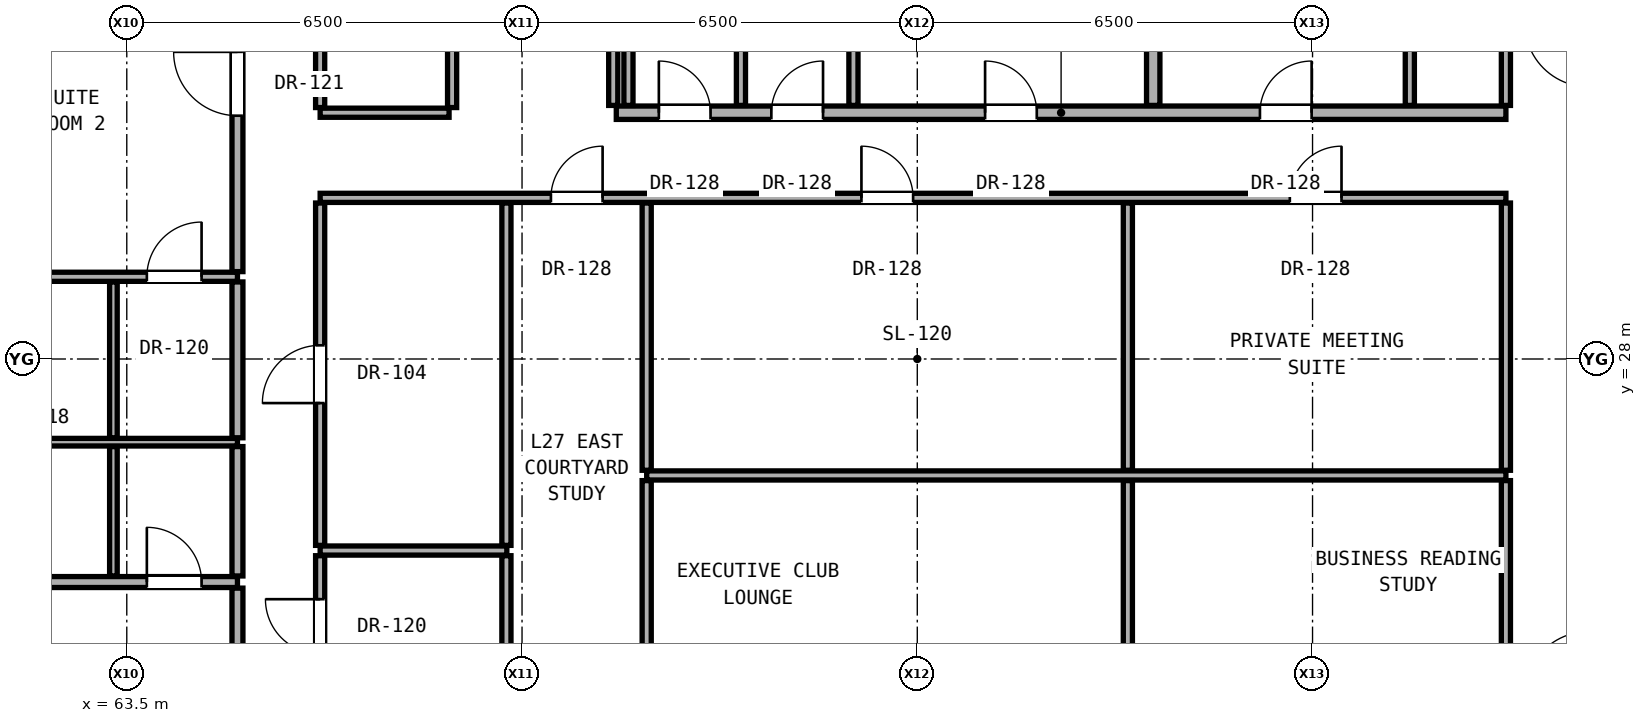
"""IFC4 building model, lengths in metres.
Left out: names, types, materials, properties, quantities, classifications, styles, units other than length and angle.
Written with IfcOpenShell. Run it as: python <this file> out.ifc"""

import sys

from ifc_helpers import new_model, si_unit, direction, frame, frame_2d, origin, place, context, subcontext, project, spatial, rectangle, extrude, element, fill, save


model = new_model("IFC4")
c1 = context("Model", 3, precision=1e-05, world=origin(), true_north=direction((0.0, 1.0)))
c2 = subcontext(c1, "Body", "Model", "MODEL_VIEW")
j1 = project(units=[si_unit("LENGTHUNIT", "METRE"), si_unit("PLANEANGLEUNIT", "RADIAN")], contexts=[c1])
p1 = place(None, origin())
s1 = spatial("IfcSite", under=j1, at=p1, CompositionType="ELEMENT")
p2 = place(p1, origin())
s2 = spatial("IfcBuilding", under=s1, at=p2, CompositionType="ELEMENT")
p3 = place(p2, frame((0.0, 0.0, 98.3)))
s3 = spatial("IfcBuildingStorey", under=s2, at=p3, CompositionType="ELEMENT", Elevation=98.3)
p4 = place(p3, frame((58.643, 24.332, 0.0), z_axis=(0.0, 0.0, 1.0), x_axis=(1.0, 0.0, 0.0)))
e1 = element("IfcWall", 1, at=p4, inside=s3, PredefinedType="PARTITIONING", context=c2, shape_type="SweptSolid", body=[
    extrude(rectangle(XDim=6.677, YDim=0.18, at=frame_2d((3.338, 0.0))), origin(), (0.0, 0.0, 1.0), 2.216),
])
p5 = place(p4, frame((1.864, 0.0, 0.0)))
e2 = element("IfcOpeningElement", 2, at=p5, cuts=e1, PredefinedType="OPENING", context=c2, shape_type="SweptSolid", body=[
    extrude(rectangle(XDim=0.95, YDim=2.15, at=frame_2d((0.475, 1.075))), frame((0.0, 0.1, 0.0), z_axis=(0.0, -1.0, 0.0), x_axis=(1.0, 0.0, 0.0)), (0.0, 0.0, 1.0), 0.2),
])
p6 = place(p4, frame((5.187, 0.0, 0.0)))
e3 = element("IfcOpeningElement", 3, at=p6, cuts=e1, PredefinedType="OPENING", context=c2, shape_type="SweptSolid", body=[
    extrude(rectangle(XDim=0.9, YDim=2.1, at=frame_2d((0.45, 1.05))), frame((0.0, 0.1, 0.0), z_axis=(0.0, -1.0, 0.0), x_axis=(1.0, 0.0, 0.0)), (0.0, 0.0, 1.0), 0.2),
])
p7 = place(p3, frame((66.68, 24.85, 0.0), z_axis=(0.0, 0.0, 1.0), x_axis=(1.0, 0.0, 0.0)))
e4 = element("IfcWall", 4, at=p7, inside=s3, PredefinedType="PARTITIONING", context=c2, shape_type="SweptSolid", body=[
    extrude(rectangle(XDim=3.07, YDim=0.15, at=frame_2d((1.535, 0.0))), origin(), (0.0, 0.0, 1.0), 2.145),
])
p8 = place(p3, frame((72.05, 26.085, 0.0), z_axis=(0.0, 0.0, 1.0), x_axis=(1.0, 0.0, 0.0)))
e5 = element("IfcWall", 5, at=p8, inside=s3, PredefinedType="PARTITIONING", context=c2, shape_type="SweptSolid", body=[
    extrude(rectangle(XDim=14.13, YDim=0.15, at=frame_2d((7.065, 0.0))), origin(), (0.0, 0.0, 1.0), 2.145),
])
p9 = place(p3, frame((58.643, 26.632, 0.0), z_axis=(0.0, 0.0, 1.0), x_axis=(1.0, 0.0, 0.0)))
e6 = element("IfcWall", 6, at=p9, inside=s3, PredefinedType="PARTITIONING", context=c2, shape_type="SweptSolid", body=[
    extrude(rectangle(XDim=6.677, YDim=0.125, at=frame_2d((3.338, 0.0))), origin(), (0.0, 0.0, 1.0), 2.216),
])
p10 = place(p3, frame((58.643, 29.352, 0.0), z_axis=(0.0, 0.0, 1.0), x_axis=(1.0, 0.0, 0.0)))
e7 = element("IfcWall", 7, at=p10, inside=s3, PredefinedType="PARTITIONING", context=c2, shape_type="SweptSolid", body=[
    extrude(rectangle(XDim=6.677, YDim=0.15, at=frame_2d((3.338, 0.0))), origin(), (0.0, 0.0, 1.0), 2.216),
])
p11 = place(p10, frame((0.513, 0.0, 0.0)))
e8 = element("IfcOpeningElement", 8, at=p11, cuts=e7, PredefinedType="OPENING", context=c2, shape_type="SweptSolid", body=[
    extrude(rectangle(XDim=0.95, YDim=2.15, at=frame_2d((0.475, 1.075))), frame((0.0, 0.085, 0.0), z_axis=(0.0, -1.0, 0.0), x_axis=(1.0, 0.0, 0.0)), (0.0, 0.0, 1.0), 0.17),
])
p12 = place(p10, frame((5.187, 0.0, 0.0)))
e9 = element("IfcOpeningElement", 9, at=p12, cuts=e7, PredefinedType="OPENING", context=c2, shape_type="SweptSolid", body=[
    extrude(rectangle(XDim=0.9, YDim=2.1, at=frame_2d((0.45, 1.05))), frame((0.0, 0.085, 0.0), z_axis=(0.0, -1.0, 0.0), x_axis=(1.0, 0.0, 0.0)), (0.0, 0.0, 1.0), 0.17),
])
p13 = place(p3, frame((66.68, 30.65, 0.0), z_axis=(0.0, 0.0, 1.0), x_axis=(1.0, 0.0, 0.0)))
e10 = element("IfcWall", 10, at=p13, inside=s3, PredefinedType="PARTITIONING", context=c2, shape_type="SweptSolid", body=[
    extrude(rectangle(XDim=19.5, YDim=0.15, at=frame_2d((9.75, 0.0))), origin(), (0.0, 0.0, 1.0), 2.145),
])
p14 = place(p13, frame((3.795, 0.0, 0.0)))
e11 = element("IfcOpeningElement", 11, at=p14, cuts=e10, PredefinedType="OPENING", context=c2, shape_type="SweptSolid", body=[
    extrude(rectangle(XDim=0.85, YDim=2.01, at=frame_2d((0.425, 1.005))), frame((0.0, 0.085, 0.0), z_axis=(0.0, -1.0, 0.0), x_axis=(1.0, 0.0, 0.0)), (0.0, 0.0, 1.0), 0.17),
])
p15 = place(p13, frame((8.902, 0.0, 0.0)))
e12 = element("IfcOpeningElement", 12, at=p15, cuts=e10, PredefinedType="OPENING", context=c2, shape_type="SweptSolid", body=[
    extrude(rectangle(XDim=0.85, YDim=2.01, at=frame_2d((0.425, 1.005))), frame((0.0, 0.085, 0.0), z_axis=(0.0, -1.0, 0.0), x_axis=(1.0, 0.0, 0.0)), (0.0, 0.0, 1.0), 0.17),
])
p16 = place(p13, frame((15.947, 0.0, 0.0)))
e13 = element("IfcOpeningElement", 13, at=p16, cuts=e10, PredefinedType="OPENING", context=c2, shape_type="SweptSolid", body=[
    extrude(rectangle(XDim=0.85, YDim=2.01, at=frame_2d((0.425, 1.005))), frame((0.0, 0.085, 0.0), z_axis=(0.0, -1.0, 0.0), x_axis=(1.0, 0.0, 0.0)), (0.0, 0.0, 1.0), 0.17),
])
p17 = place(p3, frame((66.68, 32.05, 0.0), z_axis=(0.0, 0.0, 1.0), x_axis=(1.0, 0.0, 0.0)))
e14 = element("IfcWall", 14, at=p17, inside=s3, PredefinedType="PARTITIONING", context=c2, shape_type="SweptSolid", body=[
    extrude(rectangle(XDim=2.12, YDim=0.15, at=frame_2d((1.06, 0.0))), origin(), (0.0, 0.0, 1.0), 2.145),
])
p18 = place(p3, frame((71.55, 32.05, 0.0), z_axis=(0.0, 0.0, 1.0), x_axis=(1.0, 0.0, 0.0)))
e15 = element("IfcWall", 15, at=p18, inside=s3, PredefinedType="SOLIDWALL", context=c2, shape_type="SweptSolid", body=[
    extrude(rectangle(XDim=14.63, YDim=0.22, at=frame_2d((7.315, 0.0))), origin(), (0.0, 0.0, 1.0), 2.145),
])
p19 = place(p18, frame((6.065, 0.0, 0.0)))
e16 = element("IfcOpeningElement", 16, at=p19, cuts=e15, PredefinedType="OPENING", context=c2, shape_type="SweptSolid", body=[
    extrude(rectangle(XDim=0.85, YDim=2.01, at=frame_2d((0.425, 1.005))), frame((0.0, 0.12, 0.0), z_axis=(0.0, -1.0, 0.0), x_axis=(1.0, 0.0, 0.0)), (0.0, 0.0, 1.0), 0.24),
])
p20 = place(p18, frame((10.585, 0.0, 0.0)))
e17 = element("IfcOpeningElement", 17, at=p20, cuts=e15, PredefinedType="OPENING", context=c2, shape_type="SweptSolid", body=[
    extrude(rectangle(XDim=0.85, YDim=2.01, at=frame_2d((0.425, 1.005))), frame((0.0, 0.12, 0.0), z_axis=(0.0, -1.0, 0.0), x_axis=(1.0, 0.0, 0.0)), (0.0, 0.0, 1.0), 0.24),
])
p21 = place(p18, frame((0.7, 0.0, 0.0)))
e18 = element("IfcOpeningElement", 18, at=p21, cuts=e15, PredefinedType="OPENING", context=c2, shape_type="SweptSolid", body=[
    extrude(rectangle(XDim=0.85, YDim=2.01, at=frame_2d((0.425, 1.005))), frame((0.0, 0.12, 0.0), z_axis=(0.0, -1.0, 0.0), x_axis=(1.0, 0.0, 0.0)), (0.0, 0.0, 1.0), 0.24),
])
p22 = place(p18, frame((2.55, 0.0, 0.0)))
e19 = element("IfcOpeningElement", 19, at=p22, cuts=e15, PredefinedType="OPENING", context=c2, shape_type="SweptSolid", body=[
    extrude(rectangle(XDim=0.85, YDim=2.01, at=frame_2d((0.425, 1.005))), frame((0.0, 0.12, 0.0), z_axis=(0.0, -1.0, 0.0), x_axis=(1.0, 0.0, 0.0)), (0.0, 0.0, 1.0), 0.24),
])
p23 = place(p3, frame((63.28, 24.432, 0.0), z_axis=(0.0, 0.0, 1.0), x_axis=(0.0, 1.0, 0.0)))
e20 = element("IfcWall", 20, at=p23, inside=s3, PredefinedType="PARTITIONING", context=c2, shape_type="SweptSolid", body=[
    extrude(rectangle(XDim=2.128, YDim=0.125, at=frame_2d((1.064, 0.0))), origin(), (0.0, 0.0, 1.0), 3.08),
])
p24 = place(p3, frame((63.28, 26.705, 0.0), z_axis=(0.0, 0.0, 1.0), x_axis=(0.0, 1.0, 0.0)))
e21 = element("IfcWall", 21, at=p24, inside=s3, PredefinedType="PARTITIONING", context=c2, shape_type="SweptSolid", body=[
    extrude(rectangle(XDim=2.562, YDim=0.125, at=frame_2d((1.281, 0.0))), origin(), (0.0, 0.0, 1.0), 2.299),
])
p25 = place(p3, frame((65.32, 20.385, 0.0), z_axis=(0.0, 0.0, 1.0), x_axis=(0.0, 1.0, 0.0)))
e22 = element("IfcWall", 22, at=p25, inside=s3, PredefinedType="PARTITIONING", context=c2, shape_type="SweptSolid", body=[
    extrude(rectangle(XDim=3.847, YDim=0.18, at=frame_2d((1.923, 0.0))), origin(), (0.0, 0.0, 1.0), 2.472),
])
p26 = place(p25, frame((1.398, 0.0, 0.0)))
e23 = element("IfcOpeningElement", 23, at=p26, cuts=e22, PredefinedType="OPENING", context=c2, shape_type="SweptSolid", body=[
    extrude(rectangle(XDim=1.05, YDim=2.2, at=frame_2d((0.525, 1.1))), frame((0.0, 0.1, 0.0), z_axis=(0.0, -1.0, 0.0), x_axis=(1.0, 0.0, 0.0)), (0.0, 0.0, 1.0), 0.2),
])
p27 = place(p3, frame((65.32, 24.432, 0.0), z_axis=(0.0, 0.0, 1.0), x_axis=(0.0, 1.0, 0.0)))
e24 = element("IfcWall", 24, at=p27, inside=s3, PredefinedType="PARTITIONING", context=c2, shape_type="SweptSolid", body=[
    extrude(rectangle(XDim=2.128, YDim=0.18, at=frame_2d((1.064, 0.0))), origin(), (0.0, 0.0, 1.0), 3.08),
])
p28 = place(p3, frame((65.32, 26.705, 0.0), z_axis=(0.0, 0.0, 1.0), x_axis=(0.0, 1.0, 0.0)))
e25 = element("IfcWall", 25, at=p28, inside=s3, PredefinedType="PARTITIONING", context=c2, shape_type="SweptSolid", body=[
    extrude(rectangle(XDim=2.562, YDim=0.18, at=frame_2d((1.281, 0.0))), origin(), (0.0, 0.0, 1.0), 2.299),
])
p29 = place(p3, frame((65.32, 29.437, 0.0), z_axis=(0.0, 0.0, 1.0), x_axis=(0.0, 1.0, 0.0)))
e26 = element("IfcWall", 26, at=p29, inside=s3, PredefinedType="PARTITIONING", context=c2, shape_type="SweptSolid", body=[
    extrude(rectangle(XDim=6.178, YDim=0.18, at=frame_2d((3.089, 0.0))), origin(), (0.0, 0.0, 1.0), 2.472),
])
p30 = place(p29, frame((2.564, 0.0, 0.0)))
e27 = element("IfcOpeningElement", 27, at=p30, cuts=e26, PredefinedType="OPENING", context=c2, shape_type="SweptSolid", body=[
    extrude(rectangle(XDim=1.05, YDim=2.2, at=frame_2d((0.525, 1.1))), frame((0.0, 0.1, 0.0), z_axis=(0.0, -1.0, 0.0), x_axis=(1.0, 0.0, 0.0)), (0.0, 0.0, 1.0), 0.2),
])
p31 = place(p3, frame((66.68, 22.435, 0.0), z_axis=(0.0, 0.0, 1.0), x_axis=(0.0, 1.0, 0.0)))
e28 = element("IfcWall", 28, at=p31, inside=s3, PredefinedType="PARTITIONING", context=c2, shape_type="SweptSolid", body=[
    extrude(rectangle(XDim=2.33, YDim=0.15, at=frame_2d((1.165, 0.0))), origin(), (0.0, 0.0, 1.0), 3.08),
])
p32 = place(p31, frame((0.715, 0.0, 0.0)))
e29 = element("IfcOpeningElement", 29, at=p32, cuts=e28, PredefinedType="OPENING", context=c2, shape_type="SweptSolid", body=[
    extrude(rectangle(XDim=0.9, YDim=2.1, at=frame_2d((0.45, 1.05))), frame((0.0, 0.085, 0.0), z_axis=(0.0, -1.0, 0.0), x_axis=(1.0, 0.0, 0.0)), (0.0, 0.0, 1.0), 0.17),
])
p33 = place(p3, frame((66.68, 24.935, 0.0), z_axis=(0.0, 0.0, 1.0), x_axis=(0.0, 1.0, 0.0)))
e30 = element("IfcWall", 30, at=p33, inside=s3, PredefinedType="PARTITIONING", context=c2, shape_type="SweptSolid", body=[
    extrude(rectangle(XDim=5.63, YDim=0.15, at=frame_2d((2.815, 0.0))), origin(), (0.0, 0.0, 1.0), 2.299),
])
p34 = place(p33, frame((2.34, 0.0, 0.0)))
e31 = element("IfcOpeningElement", 31, at=p34, cuts=e30, PredefinedType="OPENING", context=c2, shape_type="SweptSolid", body=[
    extrude(rectangle(XDim=0.95, YDim=2.15, at=frame_2d((0.475, 1.075))), frame((0.0, 0.085, 0.0), z_axis=(0.0, -1.0, 0.0), x_axis=(1.0, 0.0, 0.0)), (0.0, 0.0, 1.0), 0.17),
])
p35 = place(p3, frame((66.68, 32.135, 0.0), z_axis=(0.0, 0.0, 1.0), x_axis=(0.0, 1.0, 0.0)))
e32 = element("IfcWall", 32, at=p35, inside=s3, PredefinedType="PARTITIONING", context=c2, shape_type="SweptSolid", body=[
    extrude(rectangle(XDim=3.48, YDim=0.15, at=frame_2d((1.74, 0.0))), origin(), (0.0, 0.0, 1.0), 2.472),
])
p36 = place(p3, frame((68.85, 32.135, 0.0), z_axis=(0.0, 0.0, 1.0), x_axis=(0.0, 1.0, 0.0)))
e33 = element("IfcWall", 33, at=p36, inside=s3, PredefinedType="PARTITIONING", context=c2, shape_type="SweptSolid", body=[
    extrude(rectangle(XDim=2.745, YDim=0.15, at=frame_2d((1.373, 0.0))), origin(), (0.0, 0.0, 1.0), 3.08),
])
p37 = place(p3, frame((69.743, 22.435, 0.0), z_axis=(0.0, 0.0, 1.0), x_axis=(0.0, 1.0, 0.0)))
e34 = element("IfcWall", 34, at=p37, inside=s3, PredefinedType="PARTITIONING", context=c2, shape_type="SweptSolid", body=[
    extrude(rectangle(XDim=2.33, YDim=0.15, at=frame_2d((1.165, 0.0))), origin(), (0.0, 0.0, 1.0), 3.08),
])
p38 = place(p3, frame((69.743, 24.935, 0.0), z_axis=(0.0, 0.0, 1.0), x_axis=(0.0, 1.0, 0.0)))
e35 = element("IfcWall", 35, at=p38, inside=s3, PredefinedType="PARTITIONING", context=c2, shape_type="SweptSolid", body=[
    extrude(rectangle(XDim=5.63, YDim=0.15, at=frame_2d((2.815, 0.0))), origin(), (0.0, 0.0, 1.0), 2.145),
])
for number, where, z_axis, x_axis in (
    (36, (71.5, 32.17, 0.0), (0.0, 0.0, 1.0), (0.0, 1.0, 0.0)),
    (37, (71.75, 32.17, 0.0), (0.0, 0.0, 1.0), (0.0, 1.0, 0.0)),
):
    element("IfcWall", number, at=place(p3, frame(where, z_axis=z_axis, x_axis=x_axis)), inside=s3, PredefinedType="PARTITIONING", context=c2, shape_type="SweptSolid", body=[
        extrude(rectangle(XDim=2.71, YDim=0.15, at=frame_2d((1.355, 0.0))), origin(), (0.0, 0.0, 1.0), 3.08),
    ])
p39 = place(p3, frame((72.05, 22.435, 0.0), z_axis=(0.0, 0.0, 1.0), x_axis=(0.0, 1.0, 0.0)))
e38 = element("IfcWall", 38, at=p39, inside=s3, PredefinedType="PARTITIONING", context=c2, shape_type="SweptSolid", body=[
    extrude(rectangle(XDim=3.565, YDim=0.15, at=frame_2d((1.782, 0.0))), origin(), (0.0, 0.0, 1.0), 2.609),
])
p40 = place(p3, frame((72.05, 26.17, 0.0), z_axis=(0.0, 0.0, 1.0), x_axis=(0.0, 1.0, 0.0)))
e39 = element("IfcWall", 39, at=p40, inside=s3, PredefinedType="PARTITIONING", context=c2, shape_type="SweptSolid", body=[
    extrude(rectangle(XDim=4.395, YDim=0.15, at=frame_2d((2.198, 0.0))), origin(), (0.0, 0.0, 1.0), 2.145),
])
for number, where, z_axis, x_axis in (
    (40, (73.6, 32.17, 0.0), (0.0, 0.0, 1.0), (0.0, 1.0, 0.0)),
    (41, (75.45, 32.17, 0.0), (0.0, 0.0, 1.0), (0.0, 1.0, 0.0)),
):
    element("IfcWall", number, at=place(p3, frame(where, z_axis=z_axis, x_axis=x_axis)), inside=s3, PredefinedType="PARTITIONING", context=c2, shape_type="SweptSolid", body=[
        extrude(rectangle(XDim=2.71, YDim=0.15, at=frame_2d((1.355, 0.0))), origin(), (0.0, 0.0, 1.0), 3.08),
    ])
p41 = place(p3, frame((79.963, 22.435, 0.0), z_axis=(0.0, 0.0, 1.0), x_axis=(0.0, 1.0, 0.0)))
e42 = element("IfcWall", 42, at=p41, inside=s3, PredefinedType="PARTITIONING", context=c2, shape_type="SweptSolid", body=[
    extrude(rectangle(XDim=3.565, YDim=0.15, at=frame_2d((1.782, 0.0))), origin(), (0.0, 0.0, 1.0), 3.08),
])
p42 = place(p3, frame((79.963, 26.17, 0.0), z_axis=(0.0, 0.0, 1.0), x_axis=(0.0, 1.0, 0.0)))
e43 = element("IfcWall", 43, at=p42, inside=s3, PredefinedType="PARTITIONING", context=c2, shape_type="SweptSolid", body=[
    extrude(rectangle(XDim=4.395, YDim=0.15, at=frame_2d((2.198, 0.0))), origin(), (0.0, 0.0, 1.0), 2.145),
])
p43 = place(p3, frame((80.38, 32.17, 0.0), z_axis=(0.0, 0.0, 1.0), x_axis=(0.0, 1.0, 0.0)))
e44 = element("IfcWall", 44, at=p43, inside=s3, PredefinedType="SOLIDWALL", context=c2, shape_type="SweptSolid", body=[
    extrude(rectangle(XDim=2.71, YDim=0.22, at=frame_2d((1.355, 0.0))), origin(), (0.0, 0.0, 1.0), 3.08),
])
p44 = place(p3, frame((84.6, 32.17, 0.0), z_axis=(0.0, 0.0, 1.0), x_axis=(0.0, 1.0, 0.0)))
e45 = element("IfcWall", 45, at=p44, inside=s3, PredefinedType="PARTITIONING", context=c2, shape_type="SweptSolid", body=[
    extrude(rectangle(XDim=2.71, YDim=0.15, at=frame_2d((1.355, 0.0))), origin(), (0.0, 0.0, 1.0), 3.08),
])
p45 = place(p3, frame((86.18, 22.435, 0.0), z_axis=(0.0, 0.0, 1.0), x_axis=(0.0, 1.0, 0.0)))
e46 = element("IfcWall", 46, at=p45, inside=s3, PredefinedType="PARTITIONING", context=c2, shape_type="SweptSolid", body=[
    extrude(rectangle(XDim=3.565, YDim=0.15, at=frame_2d((1.782, 0.0))), origin(), (0.0, 0.0, 1.0), 3.08),
])
p46 = place(p3, frame((86.18, 26.17, 0.0), z_axis=(0.0, 0.0, 1.0), x_axis=(0.0, 1.0, 0.0)))
e47 = element("IfcWall", 47, at=p46, inside=s3, PredefinedType="PARTITIONING", context=c2, shape_type="SweptSolid", body=[
    extrude(rectangle(XDim=4.395, YDim=0.15, at=frame_2d((2.198, 0.0))), origin(), (0.0, 0.0, 1.0), 2.299),
])
p47 = place(p3, frame((86.18, 32.17, 0.0), z_axis=(0.0, 0.0, 1.0), x_axis=(0.0, 1.0, 0.0)))
e48 = element("IfcWall", 48, at=p47, inside=s3, PredefinedType="PARTITIONING", context=c2, shape_type="SweptSolid", body=[
    extrude(rectangle(XDim=3.445, YDim=0.15, at=frame_2d((1.723, 0.0))), origin(), (0.0, 0.0, 1.0), 2.472),
])
p48 = place(p19, origin())
e49 = element("IfcDoor", 49, at=p48, inside=s3, OperationType="SINGLE_SWING_LEFT", PredefinedType="DOOR", context=c2, shape_type="SweptSolid", body=[
    extrude(rectangle(XDim=0.85, YDim=2.01, at=frame_2d((0.425, 1.005))), frame((0.0, 0.025, 0.0), z_axis=(0.0, -1.0, 0.0), x_axis=(1.0, 0.0, 0.0)), (0.0, 0.0, 1.0), 0.05),
])
fill(e16, e49)
p49 = place(p20, origin())
e50 = element("IfcDoor", 50, at=p49, inside=s3, OperationType="SINGLE_SWING_RIGHT", PredefinedType="DOOR", context=c2, shape_type="SweptSolid", body=[
    extrude(rectangle(XDim=0.85, YDim=2.01, at=frame_2d((0.425, 1.005))), frame((0.0, 0.025, 0.0), z_axis=(0.0, -1.0, 0.0), x_axis=(1.0, 0.0, 0.0)), (0.0, 0.0, 1.0), 0.05),
])
fill(e17, e50)
p50 = place(p21, origin())
e51 = element("IfcDoor", 51, at=p50, inside=s3, OperationType="SINGLE_SWING_LEFT", PredefinedType="DOOR", context=c2, shape_type="SweptSolid", body=[
    extrude(rectangle(XDim=0.85, YDim=2.01, at=frame_2d((0.425, 1.005))), frame((0.0, 0.025, 0.0), z_axis=(0.0, -1.0, 0.0), x_axis=(1.0, 0.0, 0.0)), (0.0, 0.0, 1.0), 0.05),
])
fill(e18, e51)
p51 = place(p22, origin())
e52 = element("IfcDoor", 52, at=p51, inside=s3, OperationType="SINGLE_SWING_RIGHT", PredefinedType="DOOR", context=c2, shape_type="SweptSolid", body=[
    extrude(rectangle(XDim=0.85, YDim=2.01, at=frame_2d((0.425, 1.005))), frame((0.0, 0.025, 0.0), z_axis=(0.0, -1.0, 0.0), x_axis=(1.0, 0.0, 0.0)), (0.0, 0.0, 1.0), 0.05),
])
fill(e19, e52)
p52 = place(p32, origin())
e53 = element("IfcDoor", 53, at=p52, inside=s3, OperationType="SINGLE_SWING_RIGHT", PredefinedType="DOOR", context=c2, shape_type="SweptSolid", body=[
    extrude(rectangle(XDim=0.9, YDim=2.1, at=frame_2d((0.45, 1.05))), frame((0.0, 0.025, 0.0), z_axis=(0.0, -1.0, 0.0), x_axis=(1.0, 0.0, 0.0)), (0.0, 0.0, 1.0), 0.05),
])
fill(e29, e53)
p53 = place(p6, origin())
e54 = element("IfcDoor", 54, at=p53, inside=s3, OperationType="SINGLE_SWING_LEFT", PredefinedType="DOOR", context=c2, shape_type="SweptSolid", body=[
    extrude(rectangle(XDim=0.9, YDim=2.1, at=frame_2d((0.45, 1.05))), frame((0.0, 0.025, 0.0), z_axis=(0.0, -1.0, 0.0), x_axis=(1.0, 0.0, 0.0)), (0.0, 0.0, 1.0), 0.05),
])
fill(e3, e54)
p54 = place(p30, origin())
e55 = element("IfcDoor", 55, at=p54, inside=s3, OperationType="SINGLE_SWING_RIGHT", PredefinedType="DOOR", context=c2, shape_type="SweptSolid", body=[
    extrude(rectangle(XDim=1.05, YDim=2.2, at=frame_2d((0.525, 1.1))), frame((0.0, 0.025, 0.0), z_axis=(0.0, -1.0, 0.0), x_axis=(1.0, 0.0, 0.0)), (0.0, 0.0, 1.0), 0.05),
])
fill(e27, e55)
p55 = place(p12, origin())
e56 = element("IfcDoor", 56, at=p55, inside=s3, OperationType="SINGLE_SWING_RIGHT", PredefinedType="DOOR", context=c2, shape_type="SweptSolid", body=[
    extrude(rectangle(XDim=0.9, YDim=2.1, at=frame_2d((0.45, 1.05))), frame((0.0, 0.025, 0.0), z_axis=(0.0, -1.0, 0.0), x_axis=(1.0, 0.0, 0.0)), (0.0, 0.0, 1.0), 0.05),
])
fill(e9, e56)
p56 = place(p34, origin())
e57 = element("IfcDoor", 57, at=p56, inside=s3, OperationType="SINGLE_SWING_LEFT", PredefinedType="DOOR", context=c2, shape_type="SweptSolid", body=[
    extrude(rectangle(XDim=0.95, YDim=2.15, at=frame_2d((0.475, 1.075))), frame((0.0, 0.025, 0.0), z_axis=(0.0, -1.0, 0.0), x_axis=(1.0, 0.0, 0.0)), (0.0, 0.0, 1.0), 0.05),
])
fill(e31, e57)
p57 = place(p14, origin())
e58 = element("IfcDoor", 58, at=p57, inside=s3, OperationType="SINGLE_SWING_RIGHT", PredefinedType="DOOR", context=c2, shape_type="SweptSolid", body=[
    extrude(rectangle(XDim=0.85, YDim=2.01, at=frame_2d((0.425, 1.005))), frame((0.0, 0.025, 0.0), z_axis=(0.0, -1.0, 0.0), x_axis=(1.0, 0.0, 0.0)), (0.0, 0.0, 1.0), 0.05),
])
fill(e11, e58)
p58 = place(p15, origin())
e59 = element("IfcDoor", 59, at=p58, inside=s3, OperationType="SINGLE_SWING_LEFT", PredefinedType="DOOR", context=c2, shape_type="SweptSolid", body=[
    extrude(rectangle(XDim=0.85, YDim=2.01, at=frame_2d((0.425, 1.005))), frame((0.0, 0.025, 0.0), z_axis=(0.0, -1.0, 0.0), x_axis=(1.0, 0.0, 0.0)), (0.0, 0.0, 1.0), 0.05),
])
fill(e12, e59)
p59 = place(p16, origin())
e60 = element("IfcDoor", 60, at=p59, inside=s3, OperationType="SINGLE_SWING_RIGHT", PredefinedType="DOOR", context=c2, shape_type="SweptSolid", body=[
    extrude(rectangle(XDim=0.85, YDim=2.01, at=frame_2d((0.425, 1.005))), frame((0.0, 0.025, 0.0), z_axis=(0.0, -1.0, 0.0), x_axis=(1.0, 0.0, 0.0)), (0.0, 0.0, 1.0), 0.05),
])
fill(e13, e60)
save(model, sys.argv[1])
